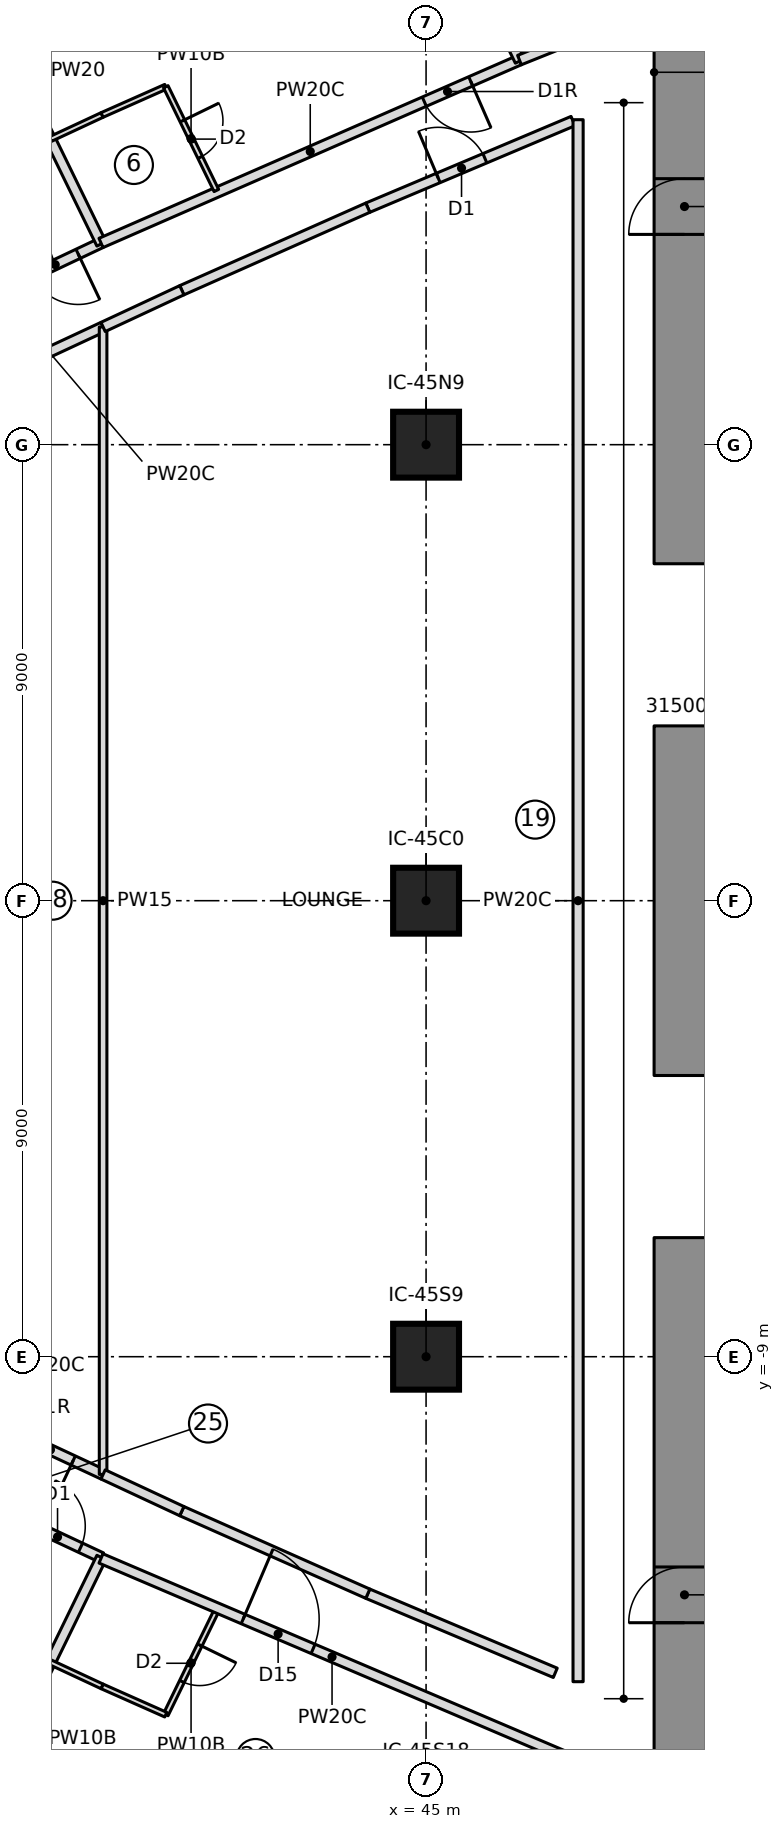
"""IFC4 building model, lengths in metres.
Left out: names, types, materials, properties, quantities, classifications, styles, units other than length and angle.
Written with IfcOpenShell. Run it as: python <this file> out.ifc"""

import sys

from ifc_helpers import new_model, si_unit, direction, frame, frame_2d, origin, origin_2d, place, context, subcontext, project, spatial, rectangle, extrude, element, fill, save


model = new_model("IFC4")
c1 = context("Model", 3, precision=1e-05, world=origin(), true_north=direction((0.0, 1.0)))
c2 = subcontext(c1, "Body", "Model", "MODEL_VIEW")
j1 = project(units=[si_unit("LENGTHUNIT", "METRE"), si_unit("PLANEANGLEUNIT", "RADIAN")], contexts=[c1])
p1 = place(None, origin())
s1 = spatial("IfcSite", under=j1, at=p1, CompositionType="ELEMENT")
p2 = place(p1, origin())
s2 = spatial("IfcBuilding", under=s1, at=p2, CompositionType="ELEMENT")
p3 = place(p2, frame((0.0, 0.0, 43.15)))
s3 = spatial("IfcBuildingStorey", under=s2, at=p3, CompositionType="ELEMENT", Elevation=43.15)
p4 = place(p3, frame((50.1, 6.65, 0.0), z_axis=(0.0, 0.0, 1.0), x_axis=(0.0, 1.0, 0.0)))
e1 = element("IfcWall", 1, at=p4, inside=s3, PredefinedType="SHEAR", context=c2, shape_type="SweptSolid", body=[
    extrude(rectangle(XDim=10.3, YDim=1.2, at=frame_2d((5.15, 0.0))), origin(), (0.0, 0.0, 1.0), 3.55),
])
p5 = place(p4, frame((6.5, 0.0, 0.0)))
e2 = element("IfcOpeningElement", 2, at=p5, cuts=e1, PredefinedType="OPENING", context=c2, shape_type="SweptSolid", body=[
    extrude(rectangle(XDim=1.1, YDim=2.1, at=frame_2d((0.55, 1.05))), frame((0.0, 0.61, 0.0), z_axis=(0.0, -1.0, 0.0), x_axis=(1.0, 0.0, 0.0)), (0.0, 0.0, 1.0), 1.22),
])
p6 = place(p3, frame((50.1, -3.45, 0.0), z_axis=(0.0, 0.0, 1.0), x_axis=(0.0, 1.0, 0.0)))
e3 = element("IfcWall", 3, at=p6, inside=s3, PredefinedType="SHEAR", context=c2, shape_type="SweptSolid", body=[
    extrude(rectangle(XDim=6.9, YDim=1.2, at=frame_2d((3.45, 0.0))), origin(), (0.0, 0.0, 1.0), 3.55),
])
p7 = place(p3, frame((50.1, -16.95, 0.0), z_axis=(0.0, 0.0, 1.0), x_axis=(0.0, 1.0, 0.0)))
e4 = element("IfcWall", 4, at=p7, inside=s3, PredefinedType="SHEAR", context=c2, shape_type="SweptSolid", body=[
    extrude(rectangle(XDim=10.3, YDim=1.2, at=frame_2d((5.15, 0.0))), origin(), (0.0, 0.0, 1.0), 3.55),
])
p8 = place(p7, frame((2.7, 0.0, 0.0)))
e5 = element("IfcOpeningElement", 5, at=p8, cuts=e4, PredefinedType="OPENING", context=c2, shape_type="SweptSolid", body=[
    extrude(rectangle(XDim=1.1, YDim=2.1, at=frame_2d((0.55, 1.05))), frame((0.0, 0.61, 0.0), z_axis=(0.0, -1.0, 0.0), x_axis=(1.0, 0.0, 0.0)), (0.0, 0.0, 1.0), 1.22),
])
for number, where, z_axis, x_axis in (
    (6, (45.0, -9.0, 0.0), (0.0, 0.0, 1.0), (1.0, 0.0, 0.0)),
    (7, (45.0, 0.0, 0.0), (0.0, 0.0, 1.0), (1.0, 0.0, 0.0)),
    (8, (45.0, 9.0, 0.0), (0.0, 0.0, 1.0), (1.0, 0.0, 0.0)),
):
    element("IfcColumn", number, at=place(p3, frame(where, z_axis=z_axis, x_axis=x_axis)), inside=s3, PredefinedType="COLUMN", context=c2, shape_type="SweptSolid", body=[
        extrude(rectangle(XDim=1.3, YDim=1.3, at=origin_2d()), origin(), (0.0, 0.0, 1.0), 3.55),
    ])
p9 = place(p3, frame((38.585, 12.981, 0.0), z_axis=(0.0, 0.0, 1.0), x_axis=(-0.903706948966, -0.428151550727, 0.0)))
e9 = element("IfcWall", 9, at=p9, inside=s3, PredefinedType="PARTITIONING", context=c2, shape_type="SweptSolid", body=[
    extrude(rectangle(XDim=4.506, YDim=0.2, at=frame_2d((2.253, 0.0))), origin(), (0.0, 0.0, 1.0), 3.25),
])
p10 = place(p9, frame((0.5, 0.0, 0.0)))
e10 = element("IfcOpeningElement", 10, at=p10, cuts=e9, PredefinedType="OPENING", context=c2, shape_type="SweptSolid", body=[
    extrude(rectangle(XDim=1.0, YDim=2.1, at=frame_2d((0.5, 1.05))), frame((0.0, 0.11, 0.0), z_axis=(0.0, -1.0, 0.0), x_axis=(1.0, 0.0, 0.0)), (0.0, 0.0, 1.0), 0.22),
])
p11 = place(p3, frame((38.594, 12.963, 0.0), z_axis=(0.0, 0.0, 1.0), x_axis=(-0.438197705697, 0.898878618459, 0.0)))
e11 = element("IfcWall", 11, at=p11, inside=s3, PredefinedType="PARTITIONING", context=c2, shape_type="SweptSolid", body=[
    extrude(rectangle(XDim=7.601, YDim=0.2, at=frame_2d((3.801, 0.0))), origin(), (0.0, 0.0, 1.0), 3.25),
])
p12 = place(p3, frame((46.844, 16.591, 0.0), z_axis=(0.0, 0.0, 1.0), x_axis=(-0.916303988169, -0.400483459415, 0.0)))
e12 = element("IfcWall", 12, at=p12, inside=s3, PredefinedType="PARTITIONING", context=c2, shape_type="SweptSolid", body=[
    extrude(rectangle(XDim=9.013, YDim=0.2, at=frame_2d((4.507, 0.0))), origin(), (0.0, 0.0, 1.0), 3.25),
])
p13 = place(p12, frame((1.05, 0.0, 0.0)))
e13 = element("IfcOpeningElement", 13, at=p13, cuts=e12, PredefinedType="OPENING", context=c2, shape_type="SweptSolid", body=[
    extrude(rectangle(XDim=1.0, YDim=2.1, at=frame_2d((0.5, 1.05))), frame((0.0, 0.11, 0.0), z_axis=(0.0, -1.0, 0.0), x_axis=(1.0, 0.0, 0.0)), (0.0, 0.0, 1.0), 0.22),
])
p14 = place(p3, frame((37.586, 15.031, 0.0), z_axis=(0.0, 0.0, 1.0), x_axis=(0.90632717857, 0.422576673972, 0.0)))
e14 = element("IfcWall", 14, at=p14, inside=s3, PredefinedType="PARTITIONING", context=c2, shape_type="SweptSolid", body=[
    extrude(rectangle(XDim=1.125, YDim=0.1, at=frame_2d((0.563, 0.0))), origin(), (0.0, 0.0, 1.0), 3.25),
])
p15 = place(p3, frame((38.606, 15.507, 0.0), z_axis=(0.0, 0.0, 1.0), x_axis=(0.913972512123, 0.405776104625, 0.0)))
e15 = element("IfcWall", 15, at=p15, inside=s3, PredefinedType="PARTITIONING", context=c2, shape_type="SweptSolid", body=[
    extrude(rectangle(XDim=1.375, YDim=0.1, at=frame_2d((0.688, 0.0))), origin(), (0.0, 0.0, 1.0), 3.25),
])
p16 = place(p3, frame((39.863, 16.065, 0.0), z_axis=(0.0, 0.0, 1.0), x_axis=(0.438233629628, -0.898861104878, 0.0)))
e16 = element("IfcWall", 16, at=p16, inside=s3, PredefinedType="PARTITIONING", context=c2, shape_type="SweptSolid", body=[
    extrude(rectangle(XDim=2.279, YDim=0.1, at=frame_2d((1.139, 0.0))), origin(), (0.0, 0.0, 1.0), 3.25),
])
p17 = place(p16, frame((0.75, 0.0, 0.0)))
e17 = element("IfcOpeningElement", 17, at=p17, cuts=e16, PredefinedType="OPENING", context=c2, shape_type="SweptSolid", body=[
    extrude(rectangle(XDim=0.8, YDim=2.1, at=frame_2d((0.4, 1.05))), frame((0.0, 0.06, 0.0), z_axis=(0.0, -1.0, 0.0), x_axis=(1.0, 0.0, 0.0)), (0.0, 0.0, 1.0), 0.12),
])
p18 = place(p3, frame((46.852, 16.573, 0.0), z_axis=(0.0, 0.0, 1.0), x_axis=(-0.438196739796, 0.898879089328, 0.0)))
e18 = element("IfcWall", 18, at=p18, inside=s3, PredefinedType="PARTITIONING", context=c2, shape_type="SweptSolid", body=[
    extrude(rectangle(XDim=7.611, YDim=0.2, at=frame_2d((3.806, 0.0))), origin(), (0.0, 0.0, 1.0), 3.25),
])
p19 = place(p3, frame((34.512, -11.052, 0.0), z_axis=(0.0, 0.0, 1.0), x_axis=(0.905585758423, -0.424163216394, 0.0)))
e19 = element("IfcWall", 19, at=p19, inside=s3, PredefinedType="PARTITIONING", context=c2, shape_type="SweptSolid", body=[
    extrude(rectangle(XDim=4.507, YDim=0.2, at=frame_2d((2.253, 0.0))), origin(), (0.0, 0.0, 1.0), 3.25),
])
p20 = place(p19, frame((3.05, 0.0, 0.0)))
e20 = element("IfcOpeningElement", 20, at=p20, cuts=e19, PredefinedType="OPENING", context=c2, shape_type="SweptSolid", body=[
    extrude(rectangle(XDim=1.0, YDim=2.1, at=frame_2d((0.5, 1.05))), frame((0.0, 0.11, 0.0), z_axis=(0.0, -1.0, 0.0), x_axis=(1.0, 0.0, 0.0)), (0.0, 0.0, 1.0), 0.22),
])
p21 = place(p3, frame((35.263, -19.796, 0.0), z_axis=(0.0, 0.0, 1.0), x_axis=(0.438197705697, 0.898878618459, 0.0)))
e21 = element("IfcWall", 21, at=p21, inside=s3, PredefinedType="PARTITIONING", context=c2, shape_type="SweptSolid", body=[
    extrude(rectangle(XDim=7.601, YDim=0.2, at=frame_2d((3.801, 0.0))), origin(), (0.0, 0.0, 1.0), 3.25),
])
p22 = place(p3, frame((40.861, -14.017, 0.0), z_axis=(0.0, 0.0, 1.0), x_axis=(-0.438233629628, -0.898861104878, 0.0)))
e22 = element("IfcWall", 22, at=p22, inside=s3, PredefinedType="PARTITIONING", context=c2, shape_type="SweptSolid", body=[
    extrude(rectangle(XDim=2.279, YDim=0.1, at=frame_2d((1.139, 0.0))), origin(), (0.0, 0.0, 1.0), 3.25),
])
p23 = place(p22, frame((0.75, 0.0, 0.0)))
e23 = element("IfcOpeningElement", 23, at=p23, cuts=e22, PredefinedType="OPENING", context=c2, shape_type="SweptSolid", body=[
    extrude(rectangle(XDim=0.8, YDim=2.1, at=frame_2d((0.4, 1.05))), frame((0.0, 0.06, 0.0), z_axis=(0.0, -1.0, 0.0), x_axis=(1.0, 0.0, 0.0)), (0.0, 0.0, 1.0), 0.12),
])
p24 = place(p3, frame((39.863, -16.065, 0.0), z_axis=(0.0, 0.0, 1.0), x_axis=(-0.913972512123, 0.405776104625, 0.0)))
e24 = element("IfcWall", 24, at=p24, inside=s3, PredefinedType="PARTITIONING", context=c2, shape_type="SweptSolid", body=[
    extrude(rectangle(XDim=1.375, YDim=0.1, at=frame_2d((0.688, 0.0))), origin(), (0.0, 0.0, 1.0), 3.25),
])
p25 = place(p3, frame((38.606, -15.507, 0.0), z_axis=(0.0, 0.0, 1.0), x_axis=(-0.90632717857, 0.422576673972, 0.0)))
e25 = element("IfcWall", 25, at=p25, inside=s3, PredefinedType="PARTITIONING", context=c2, shape_type="SweptSolid", body=[
    extrude(rectangle(XDim=1.125, YDim=0.1, at=frame_2d((0.563, 0.0))), origin(), (0.0, 0.0, 1.0), 3.25),
])
p26 = place(p3, frame((38.626, -11.323, 0.0), z_axis=(0.0, 0.0, 1.0), x_axis=(-0.906372737018, 0.422478948103, 0.0)))
e26 = element("IfcWall", 26, at=p26, inside=s3, PredefinedType="PARTITIONING", context=c2, shape_type="SweptSolid", body=[
    extrude(rectangle(XDim=2.302, YDim=0.2, at=frame_2d((1.151, 0.0))), origin(), (0.0, 0.0, 1.0), 3.25),
])
p27 = place(p26, frame((0.651, 0.0, 0.0)))
e27 = element("IfcOpeningElement", 27, at=p27, cuts=e26, PredefinedType="OPENING", context=c2, shape_type="SweptSolid", body=[
    extrude(rectangle(XDim=1.0, YDim=2.1, at=frame_2d((0.5, 1.05))), frame((0.0, 0.11, 0.0), z_axis=(0.0, -1.0, 0.0), x_axis=(1.0, 0.0, 0.0)), (0.0, 0.0, 1.0), 0.22),
])
p28 = place(p3, frame((36.54, 10.351, 0.0), z_axis=(0.0, 0.0, 1.0), x_axis=(0.906372737018, 0.422478948103, 0.0)))
e28 = element("IfcWall", 28, at=p28, inside=s3, PredefinedType="PARTITIONING", context=c2, shape_type="SweptSolid", body=[
    extrude(rectangle(XDim=2.302, YDim=0.2, at=frame_2d((1.151, 0.0))), origin(), (0.0, 0.0, 1.0), 3.25),
])
p29 = place(p3, frame((38.626, -11.323, 0.0), z_axis=(0.0, 0.0, 1.0), x_axis=(0.0, 1.0, 0.0)))
e29 = element("IfcWall", 29, at=p29, inside=s3, PredefinedType="PARTITIONING", context=c2, shape_type="SweptSolid", body=[
    extrude(rectangle(XDim=22.647, YDim=0.15, at=frame_2d((11.323, 0.0))), origin(), (0.0, 0.0, 1.0), 3.25),
])
p30 = place(p3, frame((43.85, 13.677, 0.0), z_axis=(0.0, 0.0, 1.0), x_axis=(0.921265924084, 0.388933281068, 0.0)))
e30 = element("IfcWall", 30, at=p30, inside=s3, PredefinedType="PARTITIONING", context=c2, shape_type="SweptSolid", body=[
    extrude(rectangle(XDim=4.396, YDim=0.2, at=frame_2d((2.198, 0.0))), origin(), (0.0, 0.0, 1.0), 3.25),
])
p31 = place(p30, frame((1.508, 0.0, 0.0)))
e31 = element("IfcOpeningElement", 31, at=p31, cuts=e30, PredefinedType="OPENING", context=c2, shape_type="SweptSolid", body=[
    extrude(rectangle(XDim=1.0, YDim=2.1, at=frame_2d((0.5, 1.05))), frame((0.0, 0.11, 0.0), z_axis=(0.0, -1.0, 0.0), x_axis=(1.0, 0.0, 0.0)), (0.0, 0.0, 1.0), 0.22),
])
p32 = place(p3, frame((40.18, 12.048, 0.0), z_axis=(0.0, 0.0, 1.0), x_axis=(0.913986953061, 0.405743576209, 0.0)))
e32 = element("IfcWall", 32, at=p32, inside=s3, PredefinedType="PARTITIONING", context=c2, shape_type="SweptSolid", body=[
    extrude(rectangle(XDim=4.016, YDim=0.2, at=frame_2d((2.008, 0.0))), origin(), (0.0, 0.0, 1.0), 3.25),
])
p33 = place(p3, frame((47.55, -15.239, 0.0), z_axis=(0.0, 0.0, 1.0), x_axis=(-0.921269894054, 0.388923877269, 0.0)))
e33 = element("IfcWall", 33, at=p33, inside=s3, PredefinedType="PARTITIONING", context=c2, shape_type="SweptSolid", body=[
    extrude(rectangle(XDim=4.016, YDim=0.2, at=frame_2d((2.008, 0.0))), origin(), (0.0, 0.0, 1.0), 3.25),
])
p34 = place(p3, frame((43.85, -13.677, 0.0), z_axis=(0.0, 0.0, 1.0), x_axis=(-0.913986953061, 0.405743576209, 0.0)))
e34 = element("IfcWall", 34, at=p34, inside=s3, PredefinedType="PARTITIONING", context=c2, shape_type="SweptSolid", body=[
    extrude(rectangle(XDim=4.016, YDim=0.2, at=frame_2d((2.008, 0.0))), origin(), (0.0, 0.0, 1.0), 3.25),
])
for number, where, z_axis, x_axis in (
    (35, (40.18, -12.048, 0.0), (0.0, 0.0, 1.0), (-0.906, 0.423, 0.0)),
    (36, (38.626, 11.323, 0.0), (0.0, 0.0, 1.0), (0.906, 0.423, 0.0)),
):
    element("IfcWall", number, at=place(p3, frame(where, z_axis=z_axis, x_axis=x_axis)), inside=s3, PredefinedType="PARTITIONING", context=c2, shape_type="SweptSolid", body=[
        extrude(rectangle(XDim=1.714, YDim=0.2, at=frame_2d((0.857, 0.0))), origin(), (0.0, 0.0, 1.0), 3.25),
    ])
p35 = place(p3, frame((47.704, 16.936, 0.0), z_axis=(0.0, 0.0, 1.0), x_axis=(-0.927985537407, -0.372616213232, 0.0)))
e37 = element("IfcWall", 37, at=p35, inside=s3, PredefinedType="PARTITIONING", context=c2, shape_type="SweptSolid", body=[
    extrude(rectangle(XDim=0.927, YDim=0.2, at=frame_2d((0.463, 0.0))), origin(), (0.0, 0.0, 1.0), 3.25),
])
p36 = place(p3, frame((38.585, -12.981, 0.0), z_axis=(0.0, 0.0, 1.0), x_axis=(0.919847962482, -0.392275064103, 0.0)))
e38 = element("IfcWall", 38, at=p36, inside=s3, PredefinedType="PARTITIONING", context=c2, shape_type="SweptSolid", body=[
    extrude(rectangle(XDim=9.914, YDim=0.2, at=frame_2d((4.957, 0.0))), origin(), (0.0, 0.0, 1.0), 3.25),
])
p37 = place(p36, frame((3.05, 0.0, 0.0)))
e39 = element("IfcOpeningElement", 39, at=p37, cuts=e38, PredefinedType="OPENING", context=c2, shape_type="SweptSolid", body=[
    extrude(rectangle(XDim=1.5, YDim=2.1, at=frame_2d((0.75, 1.05))), frame((0.0, 0.11, 0.0), z_axis=(0.0, -1.0, 0.0), x_axis=(1.0, 0.0, 0.0)), (0.0, 0.0, 1.0), 0.22),
])
p38 = place(p3, frame((48.0, 15.414, 0.0), z_axis=(0.0, 0.0, 1.0), x_axis=(0.0, -1.0, 0.0)))
e40 = element("IfcWall", 40, at=p38, inside=s3, PredefinedType="PARTITIONING", context=c2, shape_type="SweptSolid", body=[
    extrude(rectangle(XDim=30.828, YDim=0.2, at=frame_2d((15.414, 0.0))), origin(), (0.0, 0.0, 1.0), 3.25),
])
p39 = place(p10, origin())
e41 = element("IfcDoor", 41, at=p39, inside=s3, OperationType="SINGLE_SWING_RIGHT", PredefinedType="DOOR", context=c2, shape_type="SweptSolid", body=[
    extrude(rectangle(XDim=1.0, YDim=2.1, at=frame_2d((0.5, 1.05))), frame((0.0, 0.025, 0.0), z_axis=(0.0, -1.0, 0.0), x_axis=(1.0, 0.0, 0.0)), (0.0, 0.0, 1.0), 0.05),
])
fill(e10, e41)
p40 = place(p17, origin())
e42 = element("IfcDoor", 42, at=p40, inside=s3, OperationType="SINGLE_SWING_LEFT", PredefinedType="DOOR", context=c2, shape_type="SweptSolid", body=[
    extrude(rectangle(XDim=0.8, YDim=2.1, at=frame_2d((0.4, 1.05))), frame((0.0, 0.025, 0.0), z_axis=(0.0, -1.0, 0.0), x_axis=(1.0, 0.0, 0.0)), (0.0, 0.0, 1.0), 0.05),
])
fill(e17, e42)
p41 = place(p13, origin())
e43 = element("IfcDoor", 43, at=p41, inside=s3, OperationType="SINGLE_SWING_RIGHT", PredefinedType="DOOR", context=c2, shape_type="SweptSolid", body=[
    extrude(rectangle(XDim=1.0, YDim=2.1, at=frame_2d((0.5, 1.05))), frame((0.0, 0.025, 0.0), z_axis=(0.0, -1.0, 0.0), x_axis=(1.0, 0.0, 0.0)), (0.0, 0.0, 1.0), 0.05),
])
fill(e13, e43)
p42 = place(p20, origin())
e44 = element("IfcDoor", 44, at=p42, inside=s3, OperationType="SINGLE_SWING_LEFT", PredefinedType="DOOR", context=c2, shape_type="SweptSolid", body=[
    extrude(rectangle(XDim=1.0, YDim=2.1, at=frame_2d((0.5, 1.05))), frame((0.0, 0.025, 0.0), z_axis=(0.0, -1.0, 0.0), x_axis=(1.0, 0.0, 0.0)), (0.0, 0.0, 1.0), 0.05),
])
fill(e20, e44)
p43 = place(p23, origin())
e45 = element("IfcDoor", 45, at=p43, inside=s3, OperationType="SINGLE_SWING_LEFT", PredefinedType="DOOR", context=c2, shape_type="SweptSolid", body=[
    extrude(rectangle(XDim=0.8, YDim=2.1, at=frame_2d((0.4, 1.05))), frame((0.0, 0.025, 0.0), z_axis=(0.0, -1.0, 0.0), x_axis=(1.0, 0.0, 0.0)), (0.0, 0.0, 1.0), 0.05),
])
fill(e23, e45)
p44 = place(p37, origin())
e46 = element("IfcDoor", 46, at=p44, inside=s3, OperationType="DOUBLE_DOOR_SINGLE_SWING", PredefinedType="DOOR", context=c2, shape_type="SweptSolid", body=[
    extrude(rectangle(XDim=1.5, YDim=2.1, at=frame_2d((0.75, 1.05))), frame((0.0, 0.025, 0.0), z_axis=(0.0, -1.0, 0.0), x_axis=(1.0, 0.0, 0.0)), (0.0, 0.0, 1.0), 0.05),
])
fill(e39, e46)
p45 = place(p27, origin())
e47 = element("IfcDoor", 47, at=p45, inside=s3, OperationType="SINGLE_SWING_RIGHT", PredefinedType="DOOR", context=c2, shape_type="SweptSolid", body=[
    extrude(rectangle(XDim=1.0, YDim=2.1, at=frame_2d((0.5, 1.05))), frame((0.0, 0.025, 0.0), z_axis=(0.0, -1.0, 0.0), x_axis=(1.0, 0.0, 0.0)), (0.0, 0.0, 1.0), 0.05),
])
fill(e27, e47)
p46 = place(p31, origin())
e48 = element("IfcDoor", 48, at=p46, inside=s3, OperationType="SINGLE_SWING_LEFT", PredefinedType="DOOR", context=c2, shape_type="SweptSolid", body=[
    extrude(rectangle(XDim=1.0, YDim=2.1, at=frame_2d((0.5, 1.05))), frame((0.0, 0.025, 0.0), z_axis=(0.0, -1.0, 0.0), x_axis=(1.0, 0.0, 0.0)), (0.0, 0.0, 1.0), 0.05),
])
fill(e31, e48)
p47 = place(p5, origin())
e49 = element("IfcDoor", 49, at=p47, inside=s3, OperationType="SINGLE_SWING_RIGHT", PredefinedType="DOOR", context=c2, shape_type="SweptSolid", body=[
    extrude(rectangle(XDim=1.1, YDim=2.1, at=frame_2d((0.55, 1.05))), frame((0.0, 0.025, 0.0), z_axis=(0.0, -1.0, 0.0), x_axis=(1.0, 0.0, 0.0)), (0.0, 0.0, 1.0), 0.05),
])
fill(e2, e49)
p48 = place(p8, origin())
e50 = element("IfcDoor", 50, at=p48, inside=s3, OperationType="SINGLE_SWING_RIGHT", PredefinedType="DOOR", context=c2, shape_type="SweptSolid", body=[
    extrude(rectangle(XDim=1.1, YDim=2.1, at=frame_2d((0.55, 1.05))), frame((0.0, 0.025, 0.0), z_axis=(0.0, -1.0, 0.0), x_axis=(1.0, 0.0, 0.0)), (0.0, 0.0, 1.0), 0.05),
])
fill(e5, e50)
save(model, sys.argv[1])
